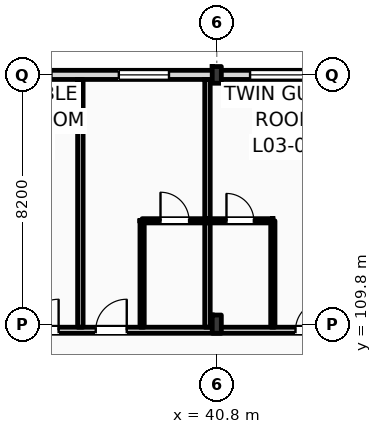
"""IFC4 building model, lengths in metres.
Left out: names, types, materials, properties, quantities, classifications, styles, units other than length and angle.
Written with IfcOpenShell. Run it as: python <this file> out.ifc"""

import sys

from ifc_helpers import new_model, si_unit, direction, frame, frame_2d, origin, origin_2d, place, context, subcontext, project, spatial, rectangle, i_section, extrude, element, fill, save


model = new_model("IFC4")
c1 = context("Model", 3, precision=1e-05, world=origin(), true_north=direction((0.0, 1.0)))
c2 = subcontext(c1, "Body", "Model", "MODEL_VIEW")
j1 = project(units=[si_unit("LENGTHUNIT", "METRE"), si_unit("PLANEANGLEUNIT", "RADIAN")], contexts=[c1])
p1 = place(None, origin())
s1 = spatial("IfcSite", under=j1, at=p1, CompositionType="ELEMENT")
p2 = place(p1, origin())
s2 = spatial("IfcBuilding", under=s1, at=p2, CompositionType="ELEMENT")
p3 = place(p2, frame((0.0, 0.0, 16.2)))
s3 = spatial("IfcBuildingStorey", under=s2, at=p3, CompositionType="ELEMENT", Elevation=16.2)
p4 = place(p3, frame((40.8, 109.8, 0.0), z_axis=(0.0, 0.0, 1.0), x_axis=(1.0, 0.0, 0.0)))
e1 = element("IfcColumn", 1, at=p4, inside=s3, PredefinedType="COLUMN", context=c2, shape_type="SweptSolid", body=[
    extrude(i_section(OverallWidth=0.3, OverallDepth=0.6, WebThickness=0.015, FlangeThickness=0.03, FilletRadius=0.027, at=origin_2d()), origin(), (0.0, 0.0, 1.0), 4.2),
])
p5 = place(p3, frame((40.8, 118.0, 0.0), z_axis=(0.0, 0.0, 1.0), x_axis=(1.0, 0.0, 0.0)))
e2 = element("IfcColumn", 2, at=p5, inside=s3, PredefinedType="COLUMN", context=c2, shape_type="SweptSolid", body=[
    extrude(i_section(OverallWidth=0.3, OverallDepth=0.55, WebThickness=0.015, FlangeThickness=0.029, FilletRadius=0.027, at=origin_2d()), origin(), (0.0, 0.0, 1.0), 4.2),
])
p6 = place(p3, frame((22.5, 118.0, 0.0), z_axis=(0.0, 0.0, 1.0), x_axis=(1.0, 0.0, 0.0)))
e3 = element("IfcWall", 3, at=p6, inside=s3, PredefinedType="STANDARD", context=c2, shape_type="SweptSolid", body=[
    extrude(rectangle(XDim=97.5, YDim=0.3, at=frame_2d((48.75, 0.0))), origin(), (0.0, 0.0, 1.0), 3.36),
])
p7 = place(p6, frame((3.721, 0.0, 0.9)))
e4 = element("IfcOpeningElement", 4, at=p7, cuts=e3, PredefinedType="OPENING", context=c2, shape_type="SweptSolid", body=[
    extrude(rectangle(XDim=0.9, YDim=1.8, at=frame_2d((0.45, 0.9))), frame((0.0, 0.16, 0.0), z_axis=(0.0, -1.0, 0.0), x_axis=(1.0, 0.0, 0.0)), (0.0, 0.0, 1.0), 0.32),
])
p8 = place(p6, frame((6.447, 0.0, 0.9)))
e5 = element("IfcOpeningElement", 5, at=p8, cuts=e3, PredefinedType="OPENING", context=c2, shape_type="SweptSolid", body=[
    extrude(rectangle(XDim=1.35, YDim=1.85, at=frame_2d((0.675, 0.925))), frame((0.0, 0.16, 0.0), z_axis=(0.0, -1.0, 0.0), x_axis=(1.0, 0.0, 0.0)), (0.0, 0.0, 1.0), 0.32),
])
p9 = place(p6, frame((11.363, 0.0, 0.9)))
e6 = element("IfcOpeningElement", 6, at=p9, cuts=e3, PredefinedType="OPENING", context=c2, shape_type="SweptSolid", body=[
    extrude(rectangle(XDim=1.5, YDim=1.9, at=frame_2d((0.75, 0.95))), frame((0.0, 0.16, 0.0), z_axis=(0.0, -1.0, 0.0), x_axis=(1.0, 0.0, 0.0)), (0.0, 0.0, 1.0), 0.32),
])
p10 = place(p6, frame((15.078, 0.0, 0.9)))
e7 = element("IfcOpeningElement", 7, at=p10, cuts=e3, PredefinedType="OPENING", context=c2, shape_type="SweptSolid", body=[
    extrude(rectangle(XDim=1.65, YDim=1.95, at=frame_2d((0.825, 0.975))), frame((0.0, 0.16, 0.0), z_axis=(0.0, -1.0, 0.0), x_axis=(1.0, 0.0, 0.0)), (0.0, 0.0, 1.0), 0.32),
])
p11 = place(p6, frame((19.395, 0.0, 0.9)))
e8 = element("IfcOpeningElement", 8, at=p11, cuts=e3, PredefinedType="OPENING", context=c2, shape_type="SweptSolid", body=[
    extrude(rectangle(XDim=1.8, YDim=2.0, at=frame_2d((0.9, 1.0))), frame((0.0, 0.16, 0.0), z_axis=(0.0, -1.0, 0.0), x_axis=(1.0, 0.0, 0.0)), (0.0, 0.0, 1.0), 0.32),
])
p12 = place(p6, frame((23.31, 0.0, 0.9)))
e9 = element("IfcOpeningElement", 9, at=p12, cuts=e3, PredefinedType="OPENING", context=c2, shape_type="SweptSolid", body=[
    extrude(rectangle(XDim=1.95, YDim=2.05, at=frame_2d((0.975, 1.025))), frame((0.0, 0.16, 0.0), z_axis=(0.0, -1.0, 0.0), x_axis=(1.0, 0.0, 0.0)), (0.0, 0.0, 1.0), 0.32),
])
p13 = place(p6, frame((28.026, 0.0, 0.9)))
e10 = element("IfcOpeningElement", 10, at=p13, cuts=e3, PredefinedType="OPENING", context=c2, shape_type="SweptSolid", body=[
    extrude(rectangle(XDim=2.1, YDim=2.1, at=frame_2d((1.05, 1.05))), frame((0.0, 0.16, 0.0), z_axis=(0.0, -1.0, 0.0), x_axis=(1.0, 0.0, 0.0)), (0.0, 0.0, 1.0), 0.32),
])
p14 = place(p6, frame((31.941, 0.0, 0.9)))
e11 = element("IfcOpeningElement", 11, at=p14, cuts=e3, PredefinedType="OPENING", context=c2, shape_type="SweptSolid", body=[
    extrude(rectangle(XDim=1.1, YDim=2.15, at=frame_2d((0.55, 1.075))), frame((0.0, 0.16, 0.0), z_axis=(0.0, -1.0, 0.0), x_axis=(1.0, 0.0, 0.0)), (0.0, 0.0, 1.0), 0.32),
])
p15 = place(p6, frame((36.657, 0.0, 0.9)))
e12 = element("IfcOpeningElement", 12, at=p15, cuts=e3, PredefinedType="OPENING", context=c2, shape_type="SweptSolid", body=[
    extrude(rectangle(XDim=2.4, YDim=2.2, at=frame_2d((1.2, 1.1))), frame((0.0, 0.16, 0.0), z_axis=(0.0, -1.0, 0.0), x_axis=(1.0, 0.0, 0.0)), (0.0, 0.0, 1.0), 0.32),
])
p16 = place(p6, frame((42.574, 0.0, 0.9)))
e13 = element("IfcOpeningElement", 13, at=p16, cuts=e3, PredefinedType="OPENING", context=c2, shape_type="SweptSolid", body=[
    extrude(rectangle(XDim=1.35, YDim=2.25, at=frame_2d((0.675, 1.125))), frame((0.0, 0.16, 0.0), z_axis=(0.0, -1.0, 0.0), x_axis=(1.0, 0.0, 0.0)), (0.0, 0.0, 1.0), 0.32),
])
p17 = place(p6, frame((45.289, 0.0, 0.9)))
e14 = element("IfcOpeningElement", 14, at=p17, cuts=e3, PredefinedType="OPENING", context=c2, shape_type="SweptSolid", body=[
    extrude(rectangle(XDim=2.7, YDim=2.28, at=frame_2d((1.35, 1.14))), frame((0.0, 0.16, 0.0), z_axis=(0.0, -1.0, 0.0), x_axis=(1.0, 0.0, 0.0)), (0.0, 0.0, 1.0), 0.32),
])
p18 = place(p6, frame((50.406, 0.0, 0.9)))
e15 = element("IfcOpeningElement", 15, at=p18, cuts=e3, PredefinedType="OPENING", context=c2, shape_type="SweptSolid", body=[
    extrude(rectangle(XDim=1.8, YDim=2.28, at=frame_2d((0.9, 1.14))), frame((0.0, 0.16, 0.0), z_axis=(0.0, -1.0, 0.0), x_axis=(1.0, 0.0, 0.0)), (0.0, 0.0, 1.0), 0.32),
])
p19 = place(p6, frame((53.922, 0.0, 0.9)))
e16 = element("IfcOpeningElement", 16, at=p19, cuts=e3, PredefinedType="OPENING", context=c2, shape_type="SweptSolid", body=[
    extrude(rectangle(XDim=1.8, YDim=2.28, at=frame_2d((0.9, 1.14))), frame((0.0, 0.16, 0.0), z_axis=(0.0, -1.0, 0.0), x_axis=(1.0, 0.0, 0.0)), (0.0, 0.0, 1.0), 0.32),
])
p20 = place(p6, frame((58.332, 0.0, 0.9)))
e17 = element("IfcOpeningElement", 17, at=p20, cuts=e3, PredefinedType="OPENING", context=c2, shape_type="SweptSolid", body=[
    extrude(rectangle(XDim=2.961, YDim=2.28, at=frame_2d((1.48, 1.14))), frame((0.0, 0.16, 0.0), z_axis=(0.0, -1.0, 0.0), x_axis=(1.0, 0.0, 0.0)), (0.0, 0.0, 1.0), 0.32),
])
p21 = place(p6, frame((62.513, 0.0, 0.9)))
e18 = element("IfcOpeningElement", 18, at=p21, cuts=e3, PredefinedType="OPENING", context=c2, shape_type="SweptSolid", body=[
    extrude(rectangle(XDim=1.8, YDim=2.28, at=frame_2d((0.9, 1.14))), frame((0.0, 0.16, 0.0), z_axis=(0.0, -1.0, 0.0), x_axis=(1.0, 0.0, 0.0)), (0.0, 0.0, 1.0), 0.32),
])
p22 = place(p6, frame((67.114, 0.0, 0.9)))
e19 = element("IfcOpeningElement", 19, at=p22, cuts=e3, PredefinedType="OPENING", context=c2, shape_type="SweptSolid", body=[
    extrude(rectangle(XDim=2.961, YDim=2.28, at=frame_2d((1.48, 1.14))), frame((0.0, 0.16, 0.0), z_axis=(0.0, -1.0, 0.0), x_axis=(1.0, 0.0, 0.0)), (0.0, 0.0, 1.0), 0.32),
])
p23 = place(p6, frame((73.695, 0.0, 0.9)))
e20 = element("IfcOpeningElement", 20, at=p23, cuts=e3, PredefinedType="OPENING", context=c2, shape_type="SweptSolid", body=[
    extrude(rectangle(XDim=1.1, YDim=2.28, at=frame_2d((0.55, 1.14))), frame((0.0, 0.16, 0.0), z_axis=(0.0, -1.0, 0.0), x_axis=(1.0, 0.0, 0.0)), (0.0, 0.0, 1.0), 0.32),
])
p24 = place(p6, frame((75.895, 0.0, 0.9)))
e21 = element("IfcOpeningElement", 21, at=p24, cuts=e3, PredefinedType="OPENING", context=c2, shape_type="SweptSolid", body=[
    extrude(rectangle(XDim=2.961, YDim=2.28, at=frame_2d((1.48, 1.14))), frame((0.0, 0.16, 0.0), z_axis=(0.0, -1.0, 0.0), x_axis=(1.0, 0.0, 0.0)), (0.0, 0.0, 1.0), 0.32),
])
p25 = place(p6, frame((81.676, 0.0, 0.9)))
e22 = element("IfcOpeningElement", 22, at=p25, cuts=e3, PredefinedType="OPENING", context=c2, shape_type="SweptSolid", body=[
    extrude(rectangle(XDim=1.8, YDim=2.28, at=frame_2d((0.9, 1.14))), frame((0.0, 0.16, 0.0), z_axis=(0.0, -1.0, 0.0), x_axis=(1.0, 0.0, 0.0)), (0.0, 0.0, 1.0), 0.32),
])
p26 = place(p6, frame((84.677, 0.0, 0.9)))
e23 = element("IfcOpeningElement", 23, at=p26, cuts=e3, PredefinedType="OPENING", context=c2, shape_type="SweptSolid", body=[
    extrude(rectangle(XDim=2.961, YDim=2.28, at=frame_2d((1.48, 1.14))), frame((0.0, 0.16, 0.0), z_axis=(0.0, -1.0, 0.0), x_axis=(1.0, 0.0, 0.0)), (0.0, 0.0, 1.0), 0.32),
])
p27 = place(p6, frame((89.999, 0.0, 0.9)))
e24 = element("IfcOpeningElement", 24, at=p27, cuts=e3, PredefinedType="OPENING", context=c2, shape_type="SweptSolid", body=[
    extrude(rectangle(XDim=1.1, YDim=1.5, at=frame_2d((0.55, 0.75))), frame((0.0, 0.16, 0.0), z_axis=(0.0, -1.0, 0.0), x_axis=(1.0, 0.0, 0.0)), (0.0, 0.0, 1.0), 0.32),
])
p28 = place(p6, frame((94.35, 0.0, 0.9)))
e25 = element("IfcOpeningElement", 25, at=p28, cuts=e3, PredefinedType="OPENING", context=c2, shape_type="SweptSolid", body=[
    extrude(rectangle(XDim=1.25, YDim=1.6, at=frame_2d((0.625, 0.8))), frame((0.0, 0.16, 0.0), z_axis=(0.0, -1.0, 0.0), x_axis=(1.0, 0.0, 0.0)), (0.0, 0.0, 1.0), 0.32),
])
p29 = place(p3, frame((10.65, 109.6, 0.0), z_axis=(0.0, 0.0, 1.0), x_axis=(1.0, 0.0, 0.0)))
e26 = element("IfcWall", 26, at=p29, inside=s3, PredefinedType="PARTITIONING", context=c2, shape_type="SweptSolid", body=[
    extrude(rectangle(XDim=109.21, YDim=0.2, at=frame_2d((54.605, 0.0))), origin(), (0.0, 0.0, 1.0), 3.36),
])
p30 = place(p29, frame((15.43, 0.0, 0.0)))
e27 = element("IfcOpeningElement", 27, at=p30, cuts=e26, PredefinedType="OPENING", context=c2, shape_type="SweptSolid", body=[
    extrude(rectangle(XDim=1.02, YDim=2.2, at=frame_2d((0.51, 1.1))), frame((0.0, 0.11, 0.0), z_axis=(0.0, -1.0, 0.0), x_axis=(1.0, 0.0, 0.0)), (0.0, 0.0, 1.0), 0.22),
])
p31 = place(p29, frame((19.537, 0.0, 0.0)))
e28 = element("IfcOpeningElement", 28, at=p31, cuts=e26, PredefinedType="OPENING", context=c2, shape_type="SweptSolid", body=[
    extrude(rectangle(XDim=1.02, YDim=2.2, at=frame_2d((0.51, 1.1))), frame((0.0, 0.11, 0.0), z_axis=(0.0, -1.0, 0.0), x_axis=(1.0, 0.0, 0.0)), (0.0, 0.0, 1.0), 0.22),
])
p32 = place(p29, frame((23.928, 0.0, 0.0)))
e29 = element("IfcOpeningElement", 29, at=p32, cuts=e26, PredefinedType="OPENING", context=c2, shape_type="SweptSolid", body=[
    extrude(rectangle(XDim=1.02, YDim=2.2, at=frame_2d((0.51, 1.1))), frame((0.0, 0.11, 0.0), z_axis=(0.0, -1.0, 0.0), x_axis=(1.0, 0.0, 0.0)), (0.0, 0.0, 1.0), 0.22),
])
p33 = place(p29, frame((26.169, 0.0, 0.0)))
e30 = element("IfcOpeningElement", 30, at=p33, cuts=e26, PredefinedType="OPENING", context=c2, shape_type="SweptSolid", body=[
    extrude(rectangle(XDim=1.02, YDim=2.2, at=frame_2d((0.51, 1.1))), frame((0.0, 0.11, 0.0), z_axis=(0.0, -1.0, 0.0), x_axis=(1.0, 0.0, 0.0)), (0.0, 0.0, 1.0), 0.22),
])
p34 = place(p29, frame((32.739, 0.0, 0.0)))
e31 = element("IfcOpeningElement", 31, at=p34, cuts=e26, PredefinedType="OPENING", context=c2, shape_type="SweptSolid", body=[
    extrude(rectangle(XDim=0.96, YDim=2.2, at=frame_2d((0.48, 1.1))), frame((0.0, 0.11, 0.0), z_axis=(0.0, -1.0, 0.0), x_axis=(1.0, 0.0, 0.0)), (0.0, 0.0, 1.0), 0.22),
])
p35 = place(p29, frame((34.98, 0.0, 0.0)))
e32 = element("IfcOpeningElement", 32, at=p35, cuts=e26, PredefinedType="OPENING", context=c2, shape_type="SweptSolid", body=[
    extrude(rectangle(XDim=0.96, YDim=2.2, at=frame_2d((0.48, 1.1))), frame((0.0, 0.11, 0.0), z_axis=(0.0, -1.0, 0.0), x_axis=(1.0, 0.0, 0.0)), (0.0, 0.0, 1.0), 0.22),
])
p36 = place(p29, frame((41.521, 0.0, 0.0)))
e33 = element("IfcOpeningElement", 33, at=p36, cuts=e26, PredefinedType="OPENING", context=c2, shape_type="SweptSolid", body=[
    extrude(rectangle(XDim=0.96, YDim=2.2, at=frame_2d((0.48, 1.1))), frame((0.0, 0.11, 0.0), z_axis=(0.0, -1.0, 0.0), x_axis=(1.0, 0.0, 0.0)), (0.0, 0.0, 1.0), 0.22),
])
p37 = place(p29, frame((43.512, 0.0, 0.0)))
e34 = element("IfcOpeningElement", 34, at=p37, cuts=e26, PredefinedType="OPENING", context=c2, shape_type="SweptSolid", body=[
    extrude(rectangle(XDim=0.96, YDim=2.2, at=frame_2d((0.48, 1.1))), frame((0.0, 0.11, 0.0), z_axis=(0.0, -1.0, 0.0), x_axis=(1.0, 0.0, 0.0)), (0.0, 0.0, 1.0), 0.22),
])
p38 = place(p29, frame((50.303, 0.0, 0.0)))
e35 = element("IfcOpeningElement", 35, at=p38, cuts=e26, PredefinedType="OPENING", context=c2, shape_type="SweptSolid", body=[
    extrude(rectangle(XDim=0.96, YDim=2.2, at=frame_2d((0.48, 1.1))), frame((0.0, 0.11, 0.0), z_axis=(0.0, -1.0, 0.0), x_axis=(1.0, 0.0, 0.0)), (0.0, 0.0, 1.0), 0.22),
])
p39 = place(p29, frame((54.944, 0.0, 0.0)))
e36 = element("IfcOpeningElement", 36, at=p39, cuts=e26, PredefinedType="OPENING", context=c2, shape_type="SweptSolid", body=[
    extrude(rectangle(XDim=0.96, YDim=2.2, at=frame_2d((0.48, 1.1))), frame((0.0, 0.11, 0.0), z_axis=(0.0, -1.0, 0.0), x_axis=(1.0, 0.0, 0.0)), (0.0, 0.0, 1.0), 0.22),
])
p40 = place(p29, frame((59.085, 0.0, 0.0)))
e37 = element("IfcOpeningElement", 37, at=p40, cuts=e26, PredefinedType="OPENING", context=c2, shape_type="SweptSolid", body=[
    extrude(rectangle(XDim=0.96, YDim=2.2, at=frame_2d((0.48, 1.1))), frame((0.0, 0.11, 0.0), z_axis=(0.0, -1.0, 0.0), x_axis=(1.0, 0.0, 0.0)), (0.0, 0.0, 1.0), 0.22),
])
p41 = place(p29, frame((63.476, 0.0, 0.0)))
e38 = element("IfcOpeningElement", 38, at=p41, cuts=e26, PredefinedType="OPENING", context=c2, shape_type="SweptSolid", body=[
    extrude(rectangle(XDim=0.96, YDim=2.2, at=frame_2d((0.48, 1.1))), frame((0.0, 0.11, 0.0), z_axis=(0.0, -1.0, 0.0), x_axis=(1.0, 0.0, 0.0)), (0.0, 0.0, 1.0), 0.22),
])
p42 = place(p29, frame((65.716, 0.0, 0.0)))
e39 = element("IfcOpeningElement", 39, at=p42, cuts=e26, PredefinedType="OPENING", context=c2, shape_type="SweptSolid", body=[
    extrude(rectangle(XDim=0.96, YDim=2.2, at=frame_2d((0.48, 1.1))), frame((0.0, 0.11, 0.0), z_axis=(0.0, -1.0, 0.0), x_axis=(1.0, 0.0, 0.0)), (0.0, 0.0, 1.0), 0.22),
])
p43 = place(p29, frame((72.257, 0.0, 0.0)))
e40 = element("IfcOpeningElement", 40, at=p43, cuts=e26, PredefinedType="OPENING", context=c2, shape_type="SweptSolid", body=[
    extrude(rectangle(XDim=0.96, YDim=2.2, at=frame_2d((0.48, 1.1))), frame((0.0, 0.11, 0.0), z_axis=(0.0, -1.0, 0.0), x_axis=(1.0, 0.0, 0.0)), (0.0, 0.0, 1.0), 0.22),
])
p44 = place(p29, frame((74.498, 0.0, 0.0)))
e41 = element("IfcOpeningElement", 41, at=p44, cuts=e26, PredefinedType="OPENING", context=c2, shape_type="SweptSolid", body=[
    extrude(rectangle(XDim=0.96, YDim=2.2, at=frame_2d((0.48, 1.1))), frame((0.0, 0.11, 0.0), z_axis=(0.0, -1.0, 0.0), x_axis=(1.0, 0.0, 0.0)), (0.0, 0.0, 1.0), 0.22),
])
p45 = place(p29, frame((81.039, 0.0, 0.0)))
e42 = element("IfcOpeningElement", 42, at=p45, cuts=e26, PredefinedType="OPENING", context=c2, shape_type="SweptSolid", body=[
    extrude(rectangle(XDim=0.96, YDim=2.2, at=frame_2d((0.48, 1.1))), frame((0.0, 0.11, 0.0), z_axis=(0.0, -1.0, 0.0), x_axis=(1.0, 0.0, 0.0)), (0.0, 0.0, 1.0), 0.22),
])
p46 = place(p29, frame((85.68, 0.0, 0.0)))
e43 = element("IfcOpeningElement", 43, at=p46, cuts=e26, PredefinedType="OPENING", context=c2, shape_type="SweptSolid", body=[
    extrude(rectangle(XDim=0.96, YDim=2.2, at=frame_2d((0.48, 1.1))), frame((0.0, 0.11, 0.0), z_axis=(0.0, -1.0, 0.0), x_axis=(1.0, 0.0, 0.0)), (0.0, 0.0, 1.0), 0.22),
])
p47 = place(p29, frame((89.82, 0.0, 0.0)))
e44 = element("IfcOpeningElement", 44, at=p47, cuts=e26, PredefinedType="OPENING", context=c2, shape_type="SweptSolid", body=[
    extrude(rectangle(XDim=0.96, YDim=2.2, at=frame_2d((0.48, 1.1))), frame((0.0, 0.11, 0.0), z_axis=(0.0, -1.0, 0.0), x_axis=(1.0, 0.0, 0.0)), (0.0, 0.0, 1.0), 0.22),
])
p48 = place(p29, frame((94.211, 0.0, 0.0)))
e45 = element("IfcOpeningElement", 45, at=p48, cuts=e26, PredefinedType="OPENING", context=c2, shape_type="SweptSolid", body=[
    extrude(rectangle(XDim=0.96, YDim=2.2, at=frame_2d((0.48, 1.1))), frame((0.0, 0.11, 0.0), z_axis=(0.0, -1.0, 0.0), x_axis=(1.0, 0.0, 0.0)), (0.0, 0.0, 1.0), 0.22),
])
p49 = place(p29, frame((98.602, 0.0, 0.0)))
e46 = element("IfcOpeningElement", 46, at=p49, cuts=e26, PredefinedType="OPENING", context=c2, shape_type="SweptSolid", body=[
    extrude(rectangle(XDim=0.96, YDim=2.2, at=frame_2d((0.48, 1.1))), frame((0.0, 0.11, 0.0), z_axis=(0.0, -1.0, 0.0), x_axis=(1.0, 0.0, 0.0)), (0.0, 0.0, 1.0), 0.22),
])
p50 = place(p29, frame((102.993, 0.0, 0.0)))
e47 = element("IfcOpeningElement", 47, at=p50, cuts=e26, PredefinedType="OPENING", context=c2, shape_type="SweptSolid", body=[
    extrude(rectangle(XDim=0.96, YDim=2.2, at=frame_2d((0.48, 1.1))), frame((0.0, 0.11, 0.0), z_axis=(0.0, -1.0, 0.0), x_axis=(1.0, 0.0, 0.0)), (0.0, 0.0, 1.0), 0.22),
])
p51 = place(p29, frame((105.269, 0.0, 0.0)))
e48 = element("IfcOpeningElement", 48, at=p51, cuts=e26, PredefinedType="OPENING", context=c2, shape_type="SweptSolid", body=[
    extrude(rectangle(XDim=0.96, YDim=2.2, at=frame_2d((0.48, 1.1))), frame((0.0, 0.11, 0.0), z_axis=(0.0, -1.0, 0.0), x_axis=(1.0, 0.0, 0.0)), (0.0, 0.0, 1.0), 0.22),
])
p52 = place(p29, frame((2.716, 0.0, 0.0)))
e49 = element("IfcOpeningElement", 49, at=p52, cuts=e26, PredefinedType="OPENING", context=c2, shape_type="SweptSolid", body=[
    extrude(rectangle(XDim=1.35, YDim=2.25, at=frame_2d((0.675, 1.125))), frame((0.0, 0.11, 0.0), z_axis=(0.0, -1.0, 0.0), x_axis=(1.0, 0.0, 0.0)), (0.0, 0.0, 1.0), 0.22),
])
p53 = place(p29, frame((6.65, 0.0, 0.0)))
e50 = element("IfcOpeningElement", 50, at=p53, cuts=e26, PredefinedType="OPENING", context=c2, shape_type="SweptSolid", body=[
    extrude(rectangle(XDim=1.35, YDim=2.25, at=frame_2d((0.675, 1.125))), frame((0.0, 0.11, 0.0), z_axis=(0.0, -1.0, 0.0), x_axis=(1.0, 0.0, 0.0)), (0.0, 0.0, 1.0), 0.22),
])
p54 = place(p29, frame((10.583, 0.0, 0.0)))
e51 = element("IfcOpeningElement", 51, at=p54, cuts=e26, PredefinedType="OPENING", context=c2, shape_type="SweptSolid", body=[
    extrude(rectangle(XDim=1.35, YDim=2.25, at=frame_2d((0.675, 1.125))), frame((0.0, 0.11, 0.0), z_axis=(0.0, -1.0, 0.0), x_axis=(1.0, 0.0, 0.0)), (0.0, 0.0, 1.0), 0.22),
])
for number, where, z_axis, x_axis in (
    (52, (36.313, 109.7, 0.0), (0.0, 0.0, 1.0), (0.0, 1.0, 0.0)),
    (53, (40.494, 109.7, 0.0), (0.0, 0.0, 1.0), (0.0, 1.0, 0.0)),
):
    element("IfcWall", number, at=place(p3, frame(where, z_axis=z_axis, x_axis=x_axis)), inside=s3, PredefinedType="PARTITIONING", context=c2, shape_type="SweptSolid", body=[
        extrude(rectangle(XDim=8.15, YDim=0.18, at=frame_2d((4.075, 0.0))), origin(), (0.0, 0.0, 1.0), 3.92),
    ])
p55 = place(p3, frame((38.344, 109.7, 0.0), z_axis=(0.0, 0.0, 1.0), x_axis=(0.0, 1.0, 0.0)))
e54 = element("IfcWall", 54, at=p55, inside=s3, PredefinedType="PARTITIONING", context=c2, shape_type="SweptSolid", body=[
    extrude(rectangle(XDim=3.5, YDim=0.14, at=frame_2d((1.75, 0.0))), origin(), (0.0, 0.0, 1.0), 3.61),
])
p56 = place(p3, frame((38.344, 113.2, 0.0), z_axis=(0.0, 0.0, 1.0), x_axis=(1.0, 0.0, 0.0)))
e55 = element("IfcWall", 55, at=p56, inside=s3, PredefinedType="PARTITIONING", context=c2, shape_type="SweptSolid", body=[
    extrude(rectangle(XDim=2.15, YDim=0.14, at=frame_2d((1.075, 0.0))), origin(), (0.0, 0.0, 1.0), 3.92),
])
p57 = place(p56, frame((0.605, 0.0, 0.0)))
e56 = element("IfcOpeningElement", 56, at=p57, cuts=e55, PredefinedType="OPENING", context=c2, shape_type="SweptSolid", body=[
    extrude(rectangle(XDim=0.94, YDim=2.15, at=frame_2d((0.47, 1.075))), frame((0.0, 0.08, 0.0), z_axis=(0.0, -1.0, 0.0), x_axis=(1.0, 0.0, 0.0)), (0.0, 0.0, 1.0), 0.16),
])
p58 = place(p3, frame((42.644, 109.7, 0.0), z_axis=(0.0, 0.0, 1.0), x_axis=(0.0, 1.0, 0.0)))
e57 = element("IfcWall", 57, at=p58, inside=s3, PredefinedType="PARTITIONING", context=c2, shape_type="SweptSolid", body=[
    extrude(rectangle(XDim=3.5, YDim=0.14, at=frame_2d((1.75, 0.0))), origin(), (0.0, 0.0, 1.0), 3.92),
])
p59 = place(p3, frame((40.494, 113.2, 0.0), z_axis=(0.0, 0.0, 1.0), x_axis=(1.0, 0.0, 0.0)))
e58 = element("IfcWall", 58, at=p59, inside=s3, PredefinedType="PARTITIONING", context=c2, shape_type="SweptSolid", body=[
    extrude(rectangle(XDim=2.15, YDim=0.14, at=frame_2d((1.075, 0.0))), origin(), (0.0, 0.0, 1.0), 3.92),
])
p60 = place(p59, frame((0.625, 0.0, 0.0)))
e59 = element("IfcOpeningElement", 59, at=p60, cuts=e58, PredefinedType="OPENING", context=c2, shape_type="SweptSolid", body=[
    extrude(rectangle(XDim=0.9, YDim=2.1, at=frame_2d((0.45, 1.05))), frame((0.0, 0.08, 0.0), z_axis=(0.0, -1.0, 0.0), x_axis=(1.0, 0.0, 0.0)), (0.0, 0.0, 1.0), 0.16),
])
p61 = place(p10, origin())
e60 = element("IfcWindow", 60, at=p61, inside=s3, PartitioningType="DOUBLE_PANEL_VERTICAL", PredefinedType="WINDOW", context=c2, shape_type="SweptSolid", body=[
    extrude(rectangle(XDim=1.65, YDim=1.95, at=frame_2d((0.825, 0.975))), frame((0.0, 0.03, 0.0), z_axis=(0.0, -1.0, 0.0), x_axis=(1.0, 0.0, 0.0)), (0.0, 0.0, 1.0), 0.06),
])
fill(e7, e60)
p62 = place(p11, origin())
e61 = element("IfcWindow", 61, at=p62, inside=s3, PartitioningType="DOUBLE_PANEL_VERTICAL", PredefinedType="WINDOW", context=c2, shape_type="SweptSolid", body=[
    extrude(rectangle(XDim=1.8, YDim=2.0, at=frame_2d((0.9, 1.0))), frame((0.0, 0.03, 0.0), z_axis=(0.0, -1.0, 0.0), x_axis=(1.0, 0.0, 0.0)), (0.0, 0.0, 1.0), 0.06),
])
fill(e8, e61)
p63 = place(p32, origin())
e62 = element("IfcDoor", 62, at=p63, inside=s3, OperationType="SINGLE_SWING_RIGHT", PredefinedType="DOOR", context=c2, shape_type="SweptSolid", body=[
    extrude(rectangle(XDim=1.02, YDim=2.2, at=frame_2d((0.51, 1.1))), frame((0.0, 0.025, 0.0), z_axis=(0.0, -1.0, 0.0), x_axis=(1.0, 0.0, 0.0)), (0.0, 0.0, 1.0), 0.05),
])
fill(e29, e62)
p64 = place(p33, origin())
e63 = element("IfcDoor", 63, at=p64, inside=s3, OperationType="SINGLE_SWING_RIGHT", PredefinedType="DOOR", context=c2, shape_type="SweptSolid", body=[
    extrude(rectangle(XDim=1.02, YDim=2.2, at=frame_2d((0.51, 1.1))), frame((0.0, 0.025, 0.0), z_axis=(0.0, -1.0, 0.0), x_axis=(1.0, 0.0, 0.0)), (0.0, 0.0, 1.0), 0.05),
])
fill(e30, e63)
p65 = place(p57, origin())
e64 = element("IfcDoor", 64, at=p65, inside=s3, OperationType="SINGLE_SWING_LEFT", PredefinedType="DOOR", context=c2, shape_type="SweptSolid", body=[
    extrude(rectangle(XDim=0.94, YDim=2.15, at=frame_2d((0.47, 1.075))), frame((0.0, 0.025, 0.0), z_axis=(0.0, -1.0, 0.0), x_axis=(1.0, 0.0, 0.0)), (0.0, 0.0, 1.0), 0.05),
])
fill(e56, e64)
p66 = place(p34, origin())
e65 = element("IfcDoor", 65, at=p66, inside=s3, OperationType="SINGLE_SWING_RIGHT", PredefinedType="DOOR", context=c2, shape_type="SweptSolid", body=[
    extrude(rectangle(XDim=0.96, YDim=2.2, at=frame_2d((0.48, 1.1))), frame((0.0, 0.025, 0.0), z_axis=(0.0, -1.0, 0.0), x_axis=(1.0, 0.0, 0.0)), (0.0, 0.0, 1.0), 0.05),
])
fill(e31, e65)
p67 = place(p60, origin())
e66 = element("IfcDoor", 66, at=p67, inside=s3, OperationType="SINGLE_SWING_LEFT", PredefinedType="DOOR", context=c2, shape_type="SweptSolid", body=[
    extrude(rectangle(XDim=0.9, YDim=2.1, at=frame_2d((0.45, 1.05))), frame((0.0, 0.025, 0.0), z_axis=(0.0, -1.0, 0.0), x_axis=(1.0, 0.0, 0.0)), (0.0, 0.0, 1.0), 0.05),
])
fill(e59, e66)
save(model, sys.argv[1])
